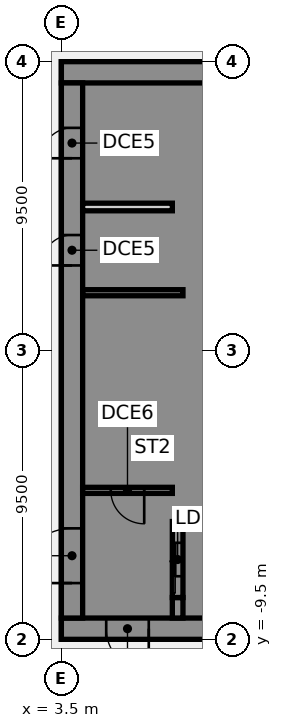
"""IFC4 building model, lengths in metres.
Left out: names, types, materials, properties, quantities, classifications, styles, units other than length and angle.
Written with IfcOpenShell. Run it as: python <this file> out.ifc"""

import sys

from ifc_helpers import new_model, si_unit, direction, frame, frame_2d, origin, place, context, subcontext, project, spatial, polyline, rectangle, outline, extrude, element, fill, save


model = new_model("IFC4")
c1 = context("Model", 3, precision=1e-05, world=origin(), true_north=direction((0.0, 1.0)))
c2 = subcontext(c1, "Body", "Model", "MODEL_VIEW")
j1 = project(units=[si_unit("LENGTHUNIT", "METRE"), si_unit("PLANEANGLEUNIT", "RADIAN")], contexts=[c1])
p1 = place(None, origin())
s1 = spatial("IfcSite", under=j1, at=p1, CompositionType="ELEMENT")
p2 = place(p1, origin())
s2 = spatial("IfcBuilding", under=s1, at=p2, CompositionType="ELEMENT")
p3 = place(p2, frame((0.0, 0.0, 45.25)))
s3 = spatial("IfcBuildingStorey", under=s2, at=p3, CompositionType="ELEMENT", Elevation=45.25)
p4 = place(p3, frame((16.5, -9.15, 0.0), z_axis=(0.0, 0.0, 1.0), x_axis=(-1.0, 0.0, 0.0)))
e1 = element("IfcWall", 1, at=p4, inside=s3, PredefinedType="SHEAR", context=c2, shape_type="SweptSolid", body=[
    extrude(rectangle(XDim=13.0, YDim=0.7, at=frame_2d((6.5, 0.0))), origin(), (0.0, 0.0, 1.0), 3.61),
])
p5 = place(p4, frame((4.15, 0.0, 0.0)))
e2 = element("IfcOpeningElement", 2, at=p5, cuts=e1, PredefinedType="OPENING", context=c2, shape_type="SweptSolid", body=[
    extrude(rectangle(XDim=1.4, YDim=2.1, at=frame_2d((0.7, 1.05))), frame((0.0, 0.36, 0.0), z_axis=(0.0, -1.0, 0.0), x_axis=(1.0, 0.0, 0.0)), (0.0, 0.0, 1.0), 0.72),
])
p6 = place(p4, frame((10.125, 0.0, 0.0)))
e3 = element("IfcOpeningElement", 3, at=p6, cuts=e1, PredefinedType="OPENING", context=c2, shape_type="SweptSolid", body=[
    extrude(rectangle(XDim=1.4, YDim=2.1, at=frame_2d((0.7, 1.05))), frame((0.0, 0.36, 0.0), z_axis=(0.0, -1.0, 0.0), x_axis=(1.0, 0.0, 0.0)), (0.0, 0.0, 1.0), 0.72),
])
p7 = place(p3, frame((16.5, 9.15, 0.0), z_axis=(0.0, 0.0, 1.0), x_axis=(-1.0, 0.0, 0.0)))
e4 = element("IfcWall", 4, at=p7, inside=s3, PredefinedType="SHEAR", context=c2, shape_type="SweptSolid", body=[
    extrude(rectangle(XDim=13.0, YDim=0.7, at=frame_2d((6.5, 0.0))), origin(), (0.0, 0.0, 1.0), 3.61),
])
p8 = place(p3, origin())
e5 = element("IfcWall", 5, at=p8, inside=s3, PredefinedType="SHEAR", context=c2, shape_type="SweptSolid", body=[
    extrude(outline(polyline([(9.8, -5.375), (7.5, -5.375), (7.5, -2.875), (9.8, -2.875), (9.8, -2.625), (7.5, -2.625), (7.5, -0.125), (9.8, -0.125), (9.8, 0.125), (7.5, 0.125), (7.5, 2.625), (9.8, 2.625), (9.8, 2.875), (7.5, 2.875), (7.5, 5.375), (9.8, 5.375), (9.8, 5.625), (7.5, 5.625), (7.5, 8.125), (9.8, 8.125), (9.8, 8.8), (7.5, 8.8), (7.15, 8.8), (7.15, -5.625), (7.5, -5.625), (9.8, -5.625), (9.8, -5.375)])), origin(), (0.0, 0.0, 1.0), 3.61),
])
p9 = place(p3, origin())
e6 = element("IfcWall", 6, at=p9, inside=s3, PredefinedType="SHEAR", context=c2, shape_type="SweptSolid", body=[
    extrude(outline(polyline([(7.5, -8.125), (7.5, -8.8), (9.8, -8.8), (9.8, -8.125), (9.8, -5.625), (9.55, -5.625), (9.55, -8.125), (7.5, -8.125)])), origin(), (0.0, 0.0, 1.0), 3.61),
])
p10 = place(p3, frame((7.325, -8.8, 0.0), z_axis=(0.0, 0.0, 1.0), x_axis=(0.0, 1.0, 0.0)))
e7 = element("IfcWall", 7, at=p10, inside=s3, PredefinedType="SHEAR", context=c2, shape_type="SweptSolid", body=[
    extrude(rectangle(XDim=0.675, YDim=0.35, at=frame_2d((0.337, 0.0))), origin(), (0.0, 0.0, 1.0), 3.61),
])
p11 = place(p3, frame((7.5, 1.9, 0.0), z_axis=(0.0, 0.0, 1.0), x_axis=(-1.0, 0.0, 0.0)))
e8 = element("IfcWall", 8, at=p11, inside=s3, PredefinedType="SHEAR", context=c2, shape_type="SweptSolid", body=[
    extrude(rectangle(XDim=3.3, YDim=0.2, at=frame_2d((1.65, 0.0))), origin(), (0.0, 0.0, 1.0), 3.61),
])
p12 = place(p3, frame((7.325, -8.125, 0.0), z_axis=(0.0, 0.0, 1.0), x_axis=(0.0, 1.0, 0.0)))
e9 = element("IfcWall", 9, at=p12, inside=s3, PredefinedType="SHEAR", context=c2, shape_type="SweptSolid", body=[
    extrude(rectangle(XDim=2.5, YDim=0.35, at=frame_2d((1.25, 0.0))), origin(), (0.0, 0.0, 1.0), 3.61),
])
p13 = place(p12, frame((0.7, 0.0, 0.0)))
e10 = element("IfcOpeningElement", 10, at=p13, cuts=e9, PredefinedType="OPENING", context=c2, shape_type="SweptSolid", body=[
    extrude(rectangle(XDim=1.1, YDim=2.1, at=frame_2d((0.55, 1.05))), frame((0.0, 0.185, 0.0), z_axis=(0.0, -1.0, 0.0), x_axis=(1.0, 0.0, 0.0)), (0.0, 0.0, 1.0), 0.37),
])
p14 = place(p3, frame((3.85, -8.8, 0.0), z_axis=(0.0, 0.0, 1.0), x_axis=(0.0, 1.0, 0.0)))
e11 = element("IfcWall", 11, at=p14, inside=s3, PredefinedType="SHEAR", context=c2, shape_type="SweptSolid", body=[
    extrude(rectangle(XDim=17.6, YDim=0.7, at=frame_2d((8.8, 0.0))), origin(), (0.0, 0.0, 1.0), 3.61),
])
p15 = place(p14, frame((1.15, 0.0, 0.0)))
e12 = element("IfcOpeningElement", 12, at=p15, cuts=e11, PredefinedType="OPENING", context=c2, shape_type="SweptSolid", body=[
    extrude(rectangle(XDim=1.8, YDim=2.1, at=frame_2d((0.9, 1.05))), frame((0.0, 0.36, 0.0), z_axis=(0.0, -1.0, 0.0), x_axis=(1.0, 0.0, 0.0)), (0.0, 0.0, 1.0), 0.72),
])
p16 = place(p14, frame((11.597, 0.0, 0.0)))
e13 = element("IfcOpeningElement", 13, at=p16, cuts=e11, PredefinedType="OPENING", context=c2, shape_type="SweptSolid", body=[
    extrude(rectangle(XDim=1.0, YDim=2.1, at=frame_2d((0.5, 1.05))), frame((0.0, 0.36, 0.0), z_axis=(0.0, -1.0, 0.0), x_axis=(1.0, 0.0, 0.0)), (0.0, 0.0, 1.0), 0.72),
])
p17 = place(p14, frame((15.123, 0.0, 0.0)))
e14 = element("IfcOpeningElement", 14, at=p17, cuts=e11, PredefinedType="OPENING", context=c2, shape_type="SweptSolid", body=[
    extrude(rectangle(XDim=1.0, YDim=2.1, at=frame_2d((0.5, 1.05))), frame((0.0, 0.36, 0.0), z_axis=(0.0, -1.0, 0.0), x_axis=(1.0, 0.0, 0.0)), (0.0, 0.0, 1.0), 0.72),
])
p18 = place(p3, frame((7.15, 4.72, 0.0), z_axis=(0.0, 0.0, 1.0), x_axis=(-1.0, 0.0, 0.0)))
e15 = element("IfcWall", 15, at=p18, inside=s3, PredefinedType="PARTITIONING", context=c2, shape_type="SweptSolid", body=[
    extrude(rectangle(XDim=2.95, YDim=0.25, at=frame_2d((1.475, 0.0))), origin(), (0.0, 0.0, 1.0), 3.61),
])
p19 = place(p3, frame((7.15, -4.6, 0.0), z_axis=(0.0, 0.0, 1.0), x_axis=(-1.0, 0.0, 0.0)))
e16 = element("IfcWall", 16, at=p19, inside=s3, PredefinedType="SHEAR", context=c2, shape_type="SweptSolid", body=[
    extrude(rectangle(XDim=2.95, YDim=0.2, at=frame_2d((1.475, 0.0))), origin(), (0.0, 0.0, 1.0), 3.61),
])
p20 = place(p19, frame((0.925, 0.0, 0.0)))
e17 = element("IfcOpeningElement", 17, at=p20, cuts=e16, PredefinedType="OPENING", context=c2, shape_type="SweptSolid", body=[
    extrude(rectangle(XDim=1.1, YDim=2.1, at=frame_2d((0.55, 1.05))), frame((0.0, 0.11, 0.0), z_axis=(0.0, -1.0, 0.0), x_axis=(1.0, 0.0, 0.0)), (0.0, 0.0, 1.0), 0.22),
])
p21 = place(p6, origin())
e18 = element("IfcDoor", 18, at=p21, inside=s3, OperationType="SINGLE_SWING_LEFT", PredefinedType="DOOR", context=c2, shape_type="SweptSolid", body=[
    extrude(rectangle(XDim=1.4, YDim=2.1, at=frame_2d((0.7, 1.05))), frame((0.0, 0.025, 0.0), z_axis=(0.0, -1.0, 0.0), x_axis=(1.0, 0.0, 0.0)), (0.0, 0.0, 1.0), 0.05),
])
fill(e3, e18)
p22 = place(p15, origin())
e19 = element("IfcDoor", 19, at=p22, inside=s3, OperationType="SINGLE_SWING_LEFT", PredefinedType="DOOR", context=c2, shape_type="SweptSolid", body=[
    extrude(rectangle(XDim=1.8, YDim=2.1, at=frame_2d((0.9, 1.05))), frame((0.0, 0.025, 0.0), z_axis=(0.0, -1.0, 0.0), x_axis=(1.0, 0.0, 0.0)), (0.0, 0.0, 1.0), 0.05),
])
fill(e12, e19)
p23 = place(p16, origin())
e20 = element("IfcDoor", 20, at=p23, inside=s3, OperationType="SINGLE_SWING_LEFT", PredefinedType="DOOR", context=c2, shape_type="SweptSolid", body=[
    extrude(rectangle(XDim=1.0, YDim=2.1, at=frame_2d((0.5, 1.05))), frame((0.0, -0.275, 0.0), z_axis=(0.0, -1.0, 0.0), x_axis=(1.0, 0.0, 0.0)), (0.0, 0.0, 1.0), 0.05),
])
fill(e13, e20)
p24 = place(p17, origin())
e21 = element("IfcDoor", 21, at=p24, inside=s3, OperationType="SINGLE_SWING_LEFT", PredefinedType="DOOR", context=c2, shape_type="SweptSolid", body=[
    extrude(rectangle(XDim=1.0, YDim=2.1, at=frame_2d((0.5, 1.05))), frame((0.0, -0.275, 0.0), z_axis=(0.0, -1.0, 0.0), x_axis=(1.0, 0.0, 0.0)), (0.0, 0.0, 1.0), 0.05),
])
fill(e14, e21)
p25 = place(p20, origin())
e22 = element("IfcDoor", 22, at=p25, inside=s3, OperationType="SINGLE_SWING_LEFT", PredefinedType="DOOR", context=c2, shape_type="SweptSolid", body=[
    extrude(rectangle(XDim=1.1, YDim=2.1, at=frame_2d((0.55, 1.05))), frame((0.0, 0.025, 0.0), z_axis=(0.0, -1.0, 0.0), x_axis=(1.0, 0.0, 0.0)), (0.0, 0.0, 1.0), 0.05),
])
fill(e17, e22)
p26 = place(p13, origin())
e23 = element("IfcDoor", 23, at=p26, inside=s3, OperationType="SLIDING_TO_LEFT", PredefinedType="DOOR", context=c2, shape_type="SweptSolid", body=[
    extrude(rectangle(XDim=1.1, YDim=2.1, at=frame_2d((0.55, 1.05))), frame((0.0, 0.025, 0.0), z_axis=(0.0, -1.0, 0.0), x_axis=(1.0, 0.0, 0.0)), (0.0, 0.0, 1.0), 0.05),
])
fill(e10, e23)
save(model, sys.argv[1])
